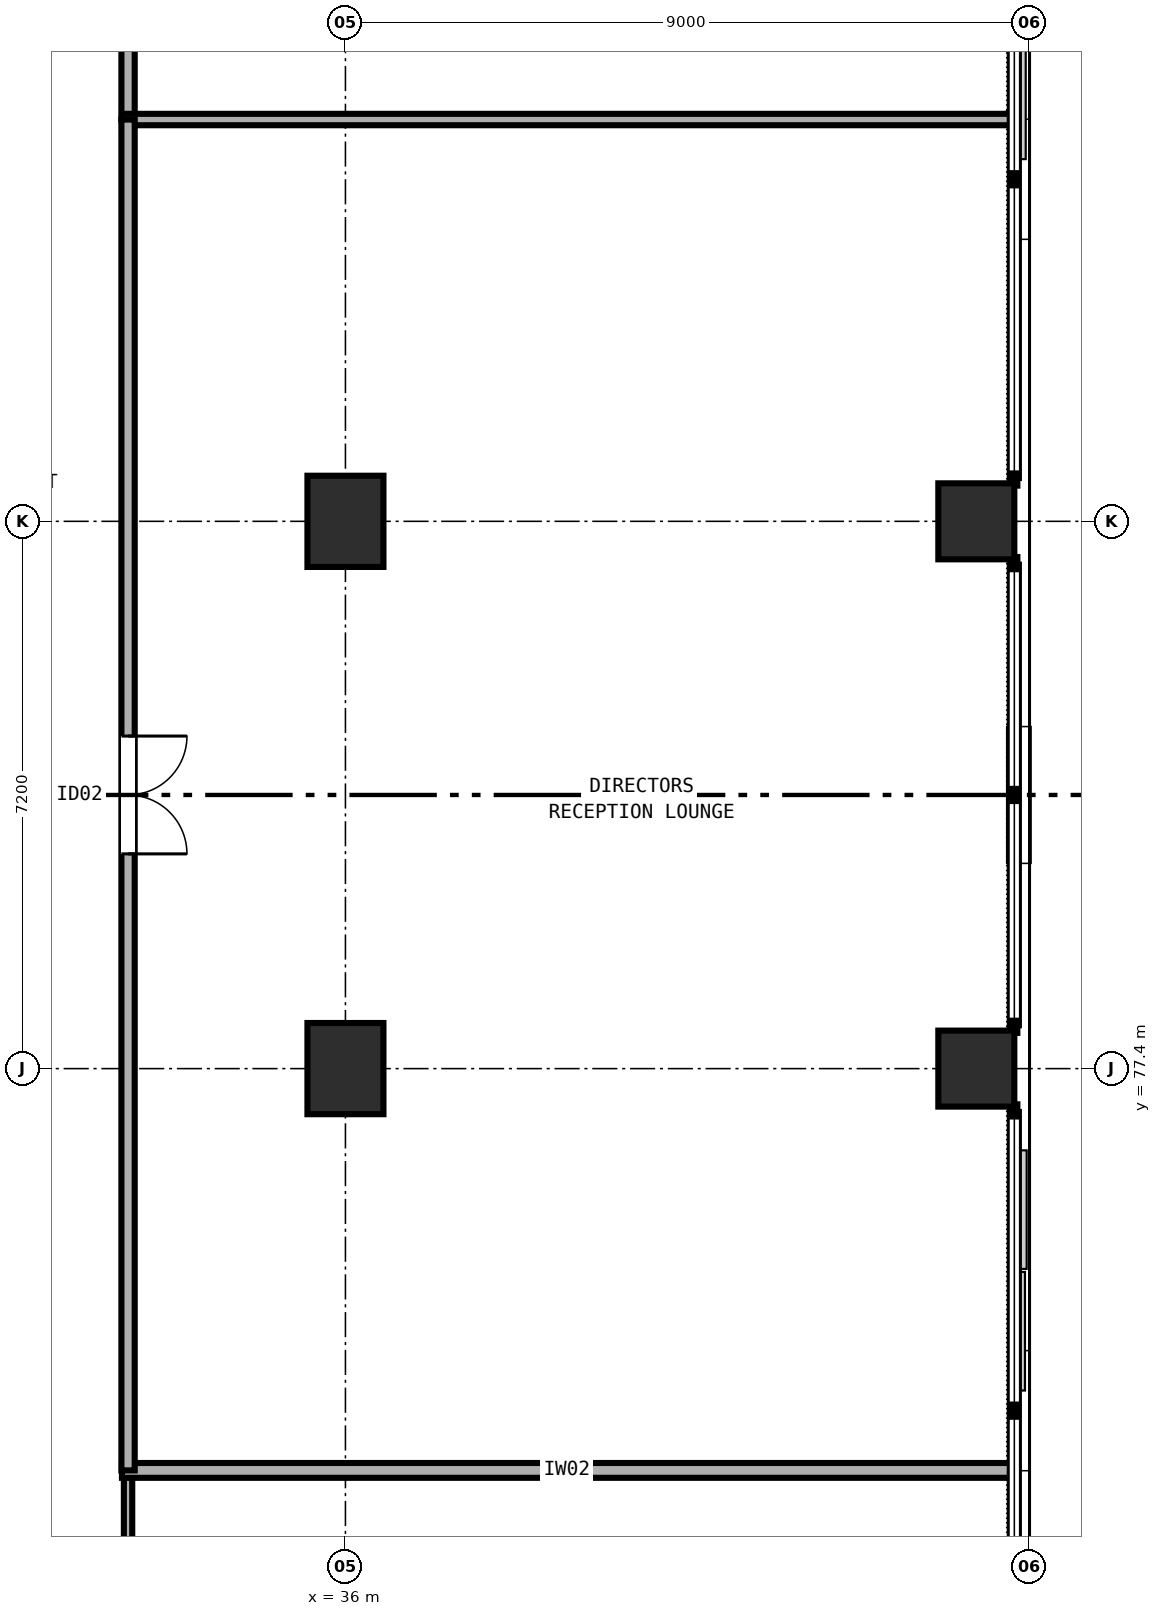
"""IFC4 building model, lengths in metres.
Left out: names, types, materials, properties, quantities, classifications, styles, units other than length and angle.
Written with IfcOpenShell. Run it as: python <this file> out.ifc"""

import sys

from ifc_helpers import new_model, si_unit, direction, frame, frame_2d, origin, origin_2d, place, context, subcontext, project, spatial, rectangle, extrude, element, fill, save


model = new_model("IFC4")
c1 = context("Model", 3, precision=1e-05, world=origin(), true_north=direction((0.0, 1.0)))
c2 = subcontext(c1, "Body", "Model", "MODEL_VIEW")
j1 = project(units=[si_unit("LENGTHUNIT", "METRE"), si_unit("PLANEANGLEUNIT", "RADIAN")], contexts=[c1])
p1 = place(None, origin())
s1 = spatial("IfcSite", under=j1, at=p1, CompositionType="ELEMENT")
p2 = place(p1, origin())
s2 = spatial("IfcBuilding", under=s1, at=p2, CompositionType="ELEMENT")
p3 = place(p2, frame((0.0, 0.0, 9.6)))
s3 = spatial("IfcBuildingStorey", under=s2, at=p3, CompositionType="ELEMENT", Elevation=9.6)
for number, where, z_axis, x_axis in (
    (1, (36.0, 77.4, 0.0), (0.0, 0.0, 1.0), (1.0, 0.0, 0.0)),
    (2, (36.0, 84.6, 0.0), (0.0, 0.0, 1.0), (1.0, 0.0, 0.0)),
):
    element("IfcColumn", number, at=place(p3, frame(where, z_axis=z_axis, x_axis=x_axis)), inside=s3, PredefinedType="COLUMN", context=c2, shape_type="SweptSolid", body=[
        extrude(rectangle(XDim=1.0, YDim=1.2, at=origin_2d()), origin(), (0.0, 0.0, 1.0), 4.8),
    ])
for number, where, z_axis, x_axis in (
    (3, (44.3, 77.4, 0.0), (0.0, 0.0, 1.0), (1.0, 0.0, 0.0)),
    (4, (44.3, 84.6, 0.0), (0.0, 0.0, 1.0), (1.0, 0.0, 0.0)),
):
    element("IfcColumn", number, at=place(p3, frame(where, z_axis=z_axis, x_axis=x_axis)), inside=s3, PredefinedType="COLUMN", context=c2, shape_type="SweptSolid", body=[
        extrude(rectangle(XDim=1.0, YDim=1.0, at=origin_2d()), origin(), (0.0, 0.0, 1.0), 4.8),
    ])
p4 = place(p3, frame((33.14, 107.658, 0.0), z_axis=(0.0, 0.0, 1.0), x_axis=(0.0, -1.0, 0.0)))
e5 = element("IfcWall", 5, at=p4, inside=s3, PredefinedType="PARTITIONING", context=c2, shape_type="SweptSolid", body=[
    extrude(rectangle(XDim=17.772, YDim=0.175, at=frame_2d((8.886, 0.0))), origin(), (0.0, 0.0, 1.0), 3.56),
])
p5 = place(p4, frame((9.238, 0.0, 0.0)))
e6 = element("IfcOpeningElement", 6, at=p5, cuts=e5, PredefinedType="OPENING", context=c2, shape_type="SweptSolid", body=[
    extrude(rectangle(XDim=1.4, YDim=2.15, at=frame_2d((0.7, 1.075))), frame((0.0, 0.097, 0.0), z_axis=(0.0, -1.0, 0.0), x_axis=(1.0, 0.0, 0.0)), (0.0, 0.0, 1.0), 0.195),
])
p6 = place(p3, frame((44.767, 89.886, 0.0), z_axis=(0.0, 0.0, 1.0), x_axis=(-1.0, 0.0, 0.0)))
e7 = element("IfcWall", 7, at=p6, inside=s3, PredefinedType="PARTITIONING", context=c2, shape_type="SweptSolid", body=[
    extrude(rectangle(XDim=11.707, YDim=0.15, at=frame_2d((5.854, 0.0))), origin(), (0.0, 0.0, 1.0), 3.56),
])
p7 = place(p3, frame((33.14, 72.114, 0.0), z_axis=(0.0, 0.0, 1.0), x_axis=(0.0, -1.0, 0.0)))
e8 = element("IfcWall", 8, at=p7, inside=s3, PredefinedType="PARTITIONING", context=c2, shape_type="SweptSolid", body=[
    extrude(rectangle(XDim=17.772, YDim=0.11, at=frame_2d((8.886, 0.0))), origin(), (0.0, 0.0, 1.0), 3.56),
])
p8 = place(p7, frame((6.984, 0.0, 0.0)))
e9 = element("IfcOpeningElement", 9, at=p8, cuts=e8, PredefinedType="OPENING", context=c2, shape_type="SweptSolid", body=[
    extrude(rectangle(XDim=1.7, YDim=2.2, at=frame_2d((0.85, 1.1))), frame((0.0, 0.065, 0.0), z_axis=(0.0, -1.0, 0.0), x_axis=(1.0, 0.0, 0.0)), (0.0, 0.0, 1.0), 0.13),
])
p9 = place(p3, frame((33.06, 72.114, 0.0), z_axis=(0.0, 0.0, 1.0), x_axis=(1.0, 0.0, 0.0)))
e10 = element("IfcWall", 10, at=p9, inside=s3, PredefinedType="PARTITIONING", context=c2, shape_type="SweptSolid", body=[
    extrude(rectangle(XDim=11.707, YDim=0.195, at=frame_2d((5.854, 0.0))), origin(), (0.0, 0.0, 1.0), 3.56),
])
p10 = place(p3, frame((33.14, 89.886, 0.0), z_axis=(0.0, 0.0, 1.0), x_axis=(0.0, -1.0, 0.0)))
e11 = element("IfcWall", 11, at=p10, inside=s3, PredefinedType="PARTITIONING", context=c2, shape_type="SweptSolid", body=[
    extrude(rectangle(XDim=17.772, YDim=0.175, at=frame_2d((8.886, 0.0))), origin(), (0.0, 0.0, 1.0), 3.56),
])
p11 = place(p10, frame((8.111, 0.0, 0.0)))
e12 = element("IfcOpeningElement", 12, at=p11, cuts=e11, PredefinedType="OPENING", context=c2, shape_type="SweptSolid", body=[
    extrude(rectangle(XDim=1.55, YDim=2.2, at=frame_2d((0.775, 1.1))), frame((0.0, 0.097, 0.0), z_axis=(0.0, -1.0, 0.0), x_axis=(1.0, 0.0, 0.0)), (0.0, 0.0, 1.0), 0.195),
])
p12 = place(p11, origin())
e13 = element("IfcDoor", 13, at=p12, inside=s3, OperationType="DOUBLE_DOOR_SINGLE_SWING", PredefinedType="DOOR", context=c2, shape_type="SweptSolid", body=[
    extrude(rectangle(XDim=1.55, YDim=2.2, at=frame_2d((0.775, 1.1))), frame((0.0, 0.025, 0.0), z_axis=(0.0, -1.0, 0.0), x_axis=(1.0, 0.0, 0.0)), (0.0, 0.0, 1.0), 0.05),
])
fill(e12, e13)
save(model, sys.argv[1])
